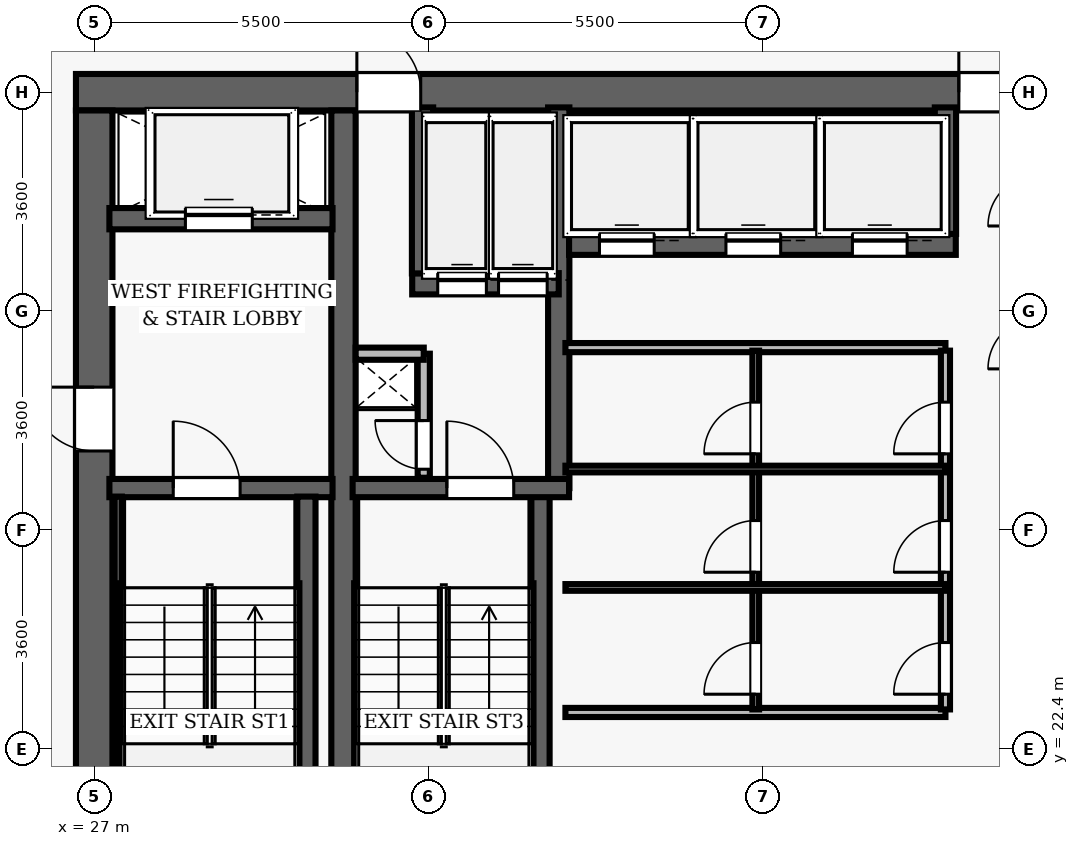
"""IFC4 building model, lengths in metres.
Left out: names, types, materials, properties, quantities, classifications, styles, units other than length and angle.
Written with IfcOpenShell. Run it as: python <this file> out.ifc"""

import sys

from ifc_helpers import new_model, si_unit, direction, frame, frame_2d, origin, place, context, subcontext, project, spatial, rectangle, extrude, element, fill, save


model = new_model("IFC4")
c1 = context("Model", 3, precision=1e-05, world=origin(), true_north=direction((0.0, 1.0)))
c2 = subcontext(c1, "Body", "Model", "MODEL_VIEW")
j1 = project(units=[si_unit("LENGTHUNIT", "METRE"), si_unit("PLANEANGLEUNIT", "RADIAN")], contexts=[c1])
p1 = place(None, origin())
s1 = spatial("IfcSite", under=j1, at=p1, CompositionType="ELEMENT")
p2 = place(p1, origin())
s2 = spatial("IfcBuilding", under=s1, at=p2, CompositionType="ELEMENT")
p3 = place(p2, frame((0.0, 0.0, 44.9)))
s3 = spatial("IfcBuildingStorey", under=s2, at=p3, CompositionType="ELEMENT", Elevation=44.9)
p4 = place(p3, frame((26.7, 33.2, 0.0), z_axis=(0.0, 0.0, 1.0), x_axis=(1.0, 0.0, 0.0)))
e1 = element("IfcWall", 1, at=p4, inside=s3, PredefinedType="SHEAR", context=c2, shape_type="SweptSolid", body=[
    extrude(rectangle(XDim=22.6, YDim=0.6, at=frame_2d((11.3, 0.0))), origin(), (0.0, 0.0, 1.0), 3.5),
])
p5 = place(p4, frame((4.62, 0.0, 0.0)))
e2 = element("IfcOpeningElement", 2, at=p5, cuts=e1, PredefinedType="OPENING", context=c2, shape_type="SweptSolid", body=[
    extrude(rectangle(XDim=1.05, YDim=2.15, at=frame_2d((0.525, 1.075))), frame((0.0, 0.31, 0.0), z_axis=(0.0, -1.0, 0.0), x_axis=(1.0, 0.0, 0.0)), (0.0, 0.0, 1.0), 0.62),
])
p6 = place(p4, frame((14.52, 0.0, 0.0)))
e3 = element("IfcOpeningElement", 3, at=p6, cuts=e1, PredefinedType="OPENING", context=c2, shape_type="SweptSolid", body=[
    extrude(rectangle(XDim=1.05, YDim=2.15, at=frame_2d((0.525, 1.075))), frame((0.0, 0.31, 0.0), z_axis=(0.0, -1.0, 0.0), x_axis=(1.0, 0.0, 0.0)), (0.0, 0.0, 1.0), 0.62),
])
p7 = place(p3, frame((27.0, 19.1, 0.0), z_axis=(0.0, 0.0, 1.0), x_axis=(0.0, 1.0, 0.0)))
e4 = element("IfcWall", 4, at=p7, inside=s3, PredefinedType="SHEAR", context=c2, shape_type="SweptSolid", body=[
    extrude(rectangle(XDim=13.8, YDim=0.6, at=frame_2d((6.9, 0.0))), origin(), (0.0, 0.0, 1.0), 3.5),
])
p8 = place(p7, frame((8.2, 0.0, 0.0)))
e5 = element("IfcOpeningElement", 5, at=p8, cuts=e4, PredefinedType="OPENING", context=c2, shape_type="SweptSolid", body=[
    extrude(rectangle(XDim=1.05, YDim=2.15, at=frame_2d((0.525, 1.075))), frame((0.0, 0.31, 0.0), z_axis=(0.0, -1.0, 0.0), x_axis=(1.0, 0.0, 0.0)), (0.0, 0.0, 1.0), 0.62),
])
p9 = place(p3, frame((31.1, 19.1, 0.0), z_axis=(0.0, 0.0, 1.0), x_axis=(0.0, 1.0, 0.0)))
e6 = element("IfcWall", 6, at=p9, inside=s3, PredefinedType="SHEAR", context=c2, shape_type="SweptSolid", body=[
    extrude(rectangle(XDim=13.8, YDim=0.4, at=frame_2d((6.9, 0.0))), origin(), (0.0, 0.0, 1.0), 3.5),
])
p10 = place(p3, frame((27.25, 26.69, 0.0), z_axis=(0.0, 0.0, 1.0), x_axis=(1.0, 0.0, 0.0)))
e7 = element("IfcWall", 7, at=p10, inside=s3, PredefinedType="SHEAR", context=c2, shape_type="SweptSolid", body=[
    extrude(rectangle(XDim=3.67, YDim=0.3, at=frame_2d((1.835, 0.0))), origin(), (0.0, 0.0, 1.0), 3.5),
])
p11 = place(p10, frame((1.05, 0.0, 0.0)))
e8 = element("IfcOpeningElement", 8, at=p11, cuts=e7, PredefinedType="OPENING", context=c2, shape_type="SweptSolid", body=[
    extrude(rectangle(XDim=1.1, YDim=2.15, at=frame_2d((0.55, 1.075))), frame((0.0, 0.16, 0.0), z_axis=(0.0, -1.0, 0.0), x_axis=(1.0, 0.0, 0.0)), (0.0, 0.0, 1.0), 0.32),
])
p12 = place(p3, frame((30.49, 19.05, 0.0), z_axis=(0.0, 0.0, 1.0), x_axis=(0.0, 1.0, 0.0)))
e9 = element("IfcWall", 9, at=p12, inside=s3, PredefinedType="SHEAR", context=c2, shape_type="SweptSolid", body=[
    extrude(rectangle(XDim=7.5, YDim=0.3, at=frame_2d((3.75, 0.0))), origin(), (0.0, 0.0, 1.0), 3.5),
])
p13 = place(p3, frame((27.395, 19.1, 0.0), z_axis=(0.0, 0.0, 1.0), x_axis=(0.0, 1.0, 0.0)))
e10 = element("IfcWall", 10, at=p13, inside=s3, PredefinedType="SHEAR", context=c2, shape_type="SweptSolid", body=[
    extrude(rectangle(XDim=7.45, YDim=0.12, at=frame_2d((3.725, 0.0))), origin(), (0.0, 0.0, 1.0), 3.5),
])
p14 = place(p3, frame((27.25, 31.12, 0.0), z_axis=(0.0, 0.0, 1.0), x_axis=(1.0, 0.0, 0.0)))
e11 = element("IfcWall", 11, at=p14, inside=s3, PredefinedType="SHEAR", context=c2, shape_type="SweptSolid", body=[
    extrude(rectangle(XDim=3.67, YDim=0.35, at=frame_2d((1.835, 0.0))), origin(), (0.0, 0.0, 1.0), 2.6),
])
p15 = place(p14, frame((1.25, 0.0, 0.0)))
e12 = element("IfcOpeningElement", 12, at=p15, cuts=e11, PredefinedType="OPENING", context=c2, shape_type="SweptSolid", body=[
    extrude(rectangle(XDim=1.1, YDim=2.15, at=frame_2d((0.55, 1.075))), frame((0.0, 0.185, 0.0), z_axis=(0.0, -1.0, 0.0), x_axis=(1.0, 0.0, 0.0)), (0.0, 0.0, 1.0), 0.37),
])
p16 = place(p3, frame((34.34, 19.05, 0.0), z_axis=(0.0, 0.0, 1.0), x_axis=(0.0, 1.0, 0.0)))
e13 = element("IfcWall", 13, at=p16, inside=s3, PredefinedType="SHEAR", context=c2, shape_type="SweptSolid", body=[
    extrude(rectangle(XDim=7.5, YDim=0.3, at=frame_2d((3.75, 0.0))), origin(), (0.0, 0.0, 1.0), 3.5),
])
p17 = place(p3, frame((34.64, 26.69, 0.0), z_axis=(0.0, 0.0, 1.0), x_axis=(0.0, 1.0, 0.0)))
e14 = element("IfcWall", 14, at=p17, inside=s3, PredefinedType="SHEAR", context=c2, shape_type="SweptSolid", body=[
    extrude(rectangle(XDim=6.26, YDim=0.35, at=frame_2d((3.13, 0.0))), origin(), (0.0, 0.0, 1.0), 3.5),
])
p18 = place(p3, frame((31.25, 26.69, 0.0), z_axis=(0.0, 0.0, 1.0), x_axis=(1.0, 0.0, 0.0)))
e15 = element("IfcWall", 15, at=p18, inside=s3, PredefinedType="SHEAR", context=c2, shape_type="SweptSolid", body=[
    extrude(rectangle(XDim=3.56, YDim=0.3, at=frame_2d((1.78, 0.0))), origin(), (0.0, 0.0, 1.0), 3.5),
])
p19 = place(p18, frame((1.55, 0.0, 0.0)))
e16 = element("IfcOpeningElement", 16, at=p19, cuts=e15, PredefinedType="OPENING", context=c2, shape_type="SweptSolid", body=[
    extrude(rectangle(XDim=1.1, YDim=2.15, at=frame_2d((0.55, 1.075))), frame((0.0, 0.16, 0.0), z_axis=(0.0, -1.0, 0.0), x_axis=(1.0, 0.0, 0.0)), (0.0, 0.0, 1.0), 0.32),
])
p20 = place(p3, frame((32.23, 30.05, 0.0), z_axis=(0.0, 0.0, 1.0), x_axis=(1.0, 0.0, 0.0)))
e17 = element("IfcWall", 17, at=p20, inside=s3, PredefinedType="SHEAR", context=c2, shape_type="SweptSolid", body=[
    extrude(rectangle(XDim=2.41, YDim=0.35, at=frame_2d((1.205, 0.0))), origin(), (0.0, 0.0, 1.0), 2.6),
])
p21 = place(p20, frame((0.42, 0.0, 0.0)))
e18 = element("IfcOpeningElement", 18, at=p21, cuts=e17, PredefinedType="OPENING", context=c2, shape_type="SweptSolid", body=[
    extrude(rectangle(XDim=0.8, YDim=2.15, at=frame_2d((0.4, 1.075))), frame((0.0, 0.185, 0.0), z_axis=(0.0, -1.0, 0.0), x_axis=(1.0, 0.0, 0.0)), (0.0, 0.0, 1.0), 0.37),
])
p22 = place(p20, frame((1.42, 0.0, 0.0)))
e19 = element("IfcOpeningElement", 19, at=p22, cuts=e17, PredefinedType="OPENING", context=c2, shape_type="SweptSolid", body=[
    extrude(rectangle(XDim=0.8, YDim=2.15, at=frame_2d((0.4, 1.075))), frame((0.0, 0.185, 0.0), z_axis=(0.0, -1.0, 0.0), x_axis=(1.0, 0.0, 0.0)), (0.0, 0.0, 1.0), 0.37),
])
p23 = place(p3, frame((32.4, 30.22, 0.0), z_axis=(0.0, 0.0, 1.0), x_axis=(0.0, 1.0, 0.0)))
e20 = element("IfcWall", 20, at=p23, inside=s3, PredefinedType="SHEAR", context=c2, shape_type="SweptSolid", body=[
    extrude(rectangle(XDim=2.73, YDim=0.35, at=frame_2d((1.365, 0.0))), origin(), (0.0, 0.0, 1.0), 2.6),
])
p24 = place(p3, frame((32.42, 26.86, 0.0), z_axis=(0.0, 0.0, 1.0), x_axis=(0.0, 1.0, 0.0)))
e21 = element("IfcWall", 21, at=p24, inside=s3, PredefinedType="PARTITIONING", context=c2, shape_type="SweptSolid", body=[
    extrude(rectangle(XDim=2.04, YDim=0.2, at=frame_2d((1.02, 0.0))), origin(), (0.0, 0.0, 1.0), 2.6),
])
p25 = place(p24, frame((0.14, 0.0, 0.0)))
e22 = element("IfcOpeningElement", 22, at=p25, cuts=e21, PredefinedType="OPENING", context=c2, shape_type="SweptSolid", body=[
    extrude(rectangle(XDim=0.8, YDim=2.05, at=frame_2d((0.4, 1.025))), frame((0.0, 0.11, 0.0), z_axis=(0.0, -1.0, 0.0), x_axis=(1.0, 0.0, 0.0)), (0.0, 0.0, 1.0), 0.22),
])
p26 = place(p3, frame((31.3, 28.9, 0.0), z_axis=(0.0, 0.0, 1.0), x_axis=(1.0, 0.0, 0.0)))
e23 = element("IfcWall", 23, at=p26, inside=s3, PredefinedType="PARTITIONING", context=c2, shape_type="SweptSolid", body=[
    extrude(rectangle(XDim=1.12, YDim=0.2, at=frame_2d((0.56, 0.0))), origin(), (0.0, 0.0, 1.0), 2.6),
])
p27 = place(p3, frame((34.81, 30.7, 0.0), z_axis=(0.0, 0.0, 1.0), x_axis=(1.0, 0.0, 0.0)))
e24 = element("IfcWall", 24, at=p27, inside=s3, PredefinedType="SHEAR", context=c2, shape_type="SweptSolid", body=[
    extrude(rectangle(XDim=6.36, YDim=0.35, at=frame_2d((3.18, 0.0))), origin(), (0.0, 0.0, 1.0), 2.6),
])
p28 = place(p27, frame((0.5, 0.0, 0.0)))
e25 = element("IfcOpeningElement", 25, at=p28, cuts=e24, PredefinedType="OPENING", context=c2, shape_type="SweptSolid", body=[
    extrude(rectangle(XDim=0.9, YDim=2.15, at=frame_2d((0.45, 1.075))), frame((0.0, 0.185, 0.0), z_axis=(0.0, -1.0, 0.0), x_axis=(1.0, 0.0, 0.0)), (0.0, 0.0, 1.0), 0.37),
])
p29 = place(p27, frame((2.58, 0.0, 0.0)))
e26 = element("IfcOpeningElement", 26, at=p29, cuts=e24, PredefinedType="OPENING", context=c2, shape_type="SweptSolid", body=[
    extrude(rectangle(XDim=0.9, YDim=2.15, at=frame_2d((0.45, 1.075))), frame((0.0, 0.185, 0.0), z_axis=(0.0, -1.0, 0.0), x_axis=(1.0, 0.0, 0.0)), (0.0, 0.0, 1.0), 0.37),
])
p30 = place(p27, frame((4.66, 0.0, 0.0)))
e27 = element("IfcOpeningElement", 27, at=p30, cuts=e24, PredefinedType="OPENING", context=c2, shape_type="SweptSolid", body=[
    extrude(rectangle(XDim=0.9, YDim=2.15, at=frame_2d((0.45, 1.075))), frame((0.0, 0.185, 0.0), z_axis=(0.0, -1.0, 0.0), x_axis=(1.0, 0.0, 0.0)), (0.0, 0.0, 1.0), 0.37),
])
p31 = place(p3, frame((41.0, 30.87, 0.0), z_axis=(0.0, 0.0, 1.0), x_axis=(0.0, 1.0, 0.0)))
e28 = element("IfcWall", 28, at=p31, inside=s3, PredefinedType="SHEAR", context=c2, shape_type="SweptSolid", body=[
    extrude(rectangle(XDim=2.08, YDim=0.35, at=frame_2d((1.04, 0.0))), origin(), (0.0, 0.0, 1.0), 2.6),
])
for number, where, z_axis, x_axis in (
    (29, (34.75, 29.0, 0.0), (0.0, 0.0, 1.0), (1.0, 0.0, 0.0)),
    (30, (34.75, 23.0, 0.0), (0.0, 0.0, 1.0), (1.0, 0.0, 0.0)),
):
    element("IfcWall", number, at=place(p3, frame(where, z_axis=z_axis, x_axis=x_axis)), inside=s3, PredefinedType="PARTITIONING", context=c2, shape_type="SweptSolid", body=[
        extrude(rectangle(XDim=6.25, YDim=0.15, at=frame_2d((3.125, 0.0))), origin(), (0.0, 0.0, 1.0), 2.6),
    ])
p32 = place(p3, frame((41.0, 23.05, 0.0), z_axis=(0.0, 0.0, 1.0), x_axis=(0.0, 1.0, 0.0)))
e31 = element("IfcWall", 31, at=p32, inside=s3, PredefinedType="PARTITIONING", context=c2, shape_type="SweptSolid", body=[
    extrude(rectangle(XDim=5.9, YDim=0.15, at=frame_2d((2.95, 0.0))), origin(), (0.0, 0.0, 1.0), 2.6),
])
p33 = place(p32, frame((0.25, 0.0, 0.0)))
e32 = element("IfcOpeningElement", 32, at=p33, cuts=e31, PredefinedType="OPENING", context=c2, shape_type="SweptSolid", body=[
    extrude(rectangle(XDim=0.85, YDim=2.1, at=frame_2d((0.425, 1.05))), frame((0.0, 0.085, 0.0), z_axis=(0.0, -1.0, 0.0), x_axis=(1.0, 0.0, 0.0)), (0.0, 0.0, 1.0), 0.17),
])
p34 = place(p32, frame((2.256, 0.0, 0.0)))
e33 = element("IfcOpeningElement", 33, at=p34, cuts=e31, PredefinedType="OPENING", context=c2, shape_type="SweptSolid", body=[
    extrude(rectangle(XDim=0.85, YDim=2.1, at=frame_2d((0.425, 1.05))), frame((0.0, 0.085, 0.0), z_axis=(0.0, -1.0, 0.0), x_axis=(1.0, 0.0, 0.0)), (0.0, 0.0, 1.0), 0.17),
])
p35 = place(p32, frame((4.203, 0.0, 0.0)))
e34 = element("IfcOpeningElement", 34, at=p35, cuts=e31, PredefinedType="OPENING", context=c2, shape_type="SweptSolid", body=[
    extrude(rectangle(XDim=0.85, YDim=2.1, at=frame_2d((0.425, 1.05))), frame((0.0, 0.085, 0.0), z_axis=(0.0, -1.0, 0.0), x_axis=(1.0, 0.0, 0.0)), (0.0, 0.0, 1.0), 0.17),
])
p36 = place(p3, frame((37.88, 23.05, 0.0), z_axis=(0.0, 0.0, 1.0), x_axis=(0.0, 1.0, 0.0)))
e35 = element("IfcWall", 35, at=p36, inside=s3, PredefinedType="PARTITIONING", context=c2, shape_type="SweptSolid", body=[
    extrude(rectangle(XDim=5.9, YDim=0.11, at=frame_2d((2.95, 0.0))), origin(), (0.0, 0.0, 1.0), 2.6),
])
p37 = place(p36, frame((0.25, 0.0, 0.0)))
e36 = element("IfcOpeningElement", 36, at=p37, cuts=e35, PredefinedType="OPENING", context=c2, shape_type="SweptSolid", body=[
    extrude(rectangle(XDim=0.85, YDim=2.1, at=frame_2d((0.425, 1.05))), frame((0.0, 0.065, 0.0), z_axis=(0.0, -1.0, 0.0), x_axis=(1.0, 0.0, 0.0)), (0.0, 0.0, 1.0), 0.13),
])
p38 = place(p36, frame((2.256, 0.0, 0.0)))
e37 = element("IfcOpeningElement", 37, at=p38, cuts=e35, PredefinedType="OPENING", context=c2, shape_type="SweptSolid", body=[
    extrude(rectangle(XDim=0.85, YDim=2.1, at=frame_2d((0.425, 1.05))), frame((0.0, 0.065, 0.0), z_axis=(0.0, -1.0, 0.0), x_axis=(1.0, 0.0, 0.0)), (0.0, 0.0, 1.0), 0.13),
])
p39 = place(p36, frame((4.203, 0.0, 0.0)))
e38 = element("IfcOpeningElement", 38, at=p39, cuts=e35, PredefinedType="OPENING", context=c2, shape_type="SweptSolid", body=[
    extrude(rectangle(XDim=0.85, YDim=2.1, at=frame_2d((0.425, 1.05))), frame((0.0, 0.065, 0.0), z_axis=(0.0, -1.0, 0.0), x_axis=(1.0, 0.0, 0.0)), (0.0, 0.0, 1.0), 0.13),
])
for number, where, z_axis, x_axis in (
    (39, (34.75, 25.056, 0.0), (0.0, 0.0, 1.0), (1.0, 0.0, 0.0)),
    (40, (34.75, 27.003, 0.0), (0.0, 0.0, 1.0), (1.0, 0.0, 0.0)),
):
    element("IfcWall", number, at=place(p3, frame(where, z_axis=z_axis, x_axis=x_axis)), inside=s3, PredefinedType="PARTITIONING", context=c2, shape_type="SweptSolid", body=[
        extrude(rectangle(XDim=6.25, YDim=0.11, at=frame_2d((3.125, 0.0))), origin(), (0.0, 0.0, 1.0), 2.6),
    ])
p40 = place(p11, origin())
e41 = element("IfcDoor", 41, at=p40, inside=s3, OperationType="SINGLE_SWING_LEFT", PredefinedType="DOOR", context=c2, shape_type="SweptSolid", body=[
    extrude(rectangle(XDim=1.1, YDim=2.15, at=frame_2d((0.55, 1.075))), frame((0.0, 0.025, 0.0), z_axis=(0.0, -1.0, 0.0), x_axis=(1.0, 0.0, 0.0)), (0.0, 0.0, 1.0), 0.05),
])
fill(e8, e41)
p41 = place(p8, origin())
e42 = element("IfcDoor", 42, at=p41, inside=s3, OperationType="SINGLE_SWING_RIGHT", PredefinedType="DOOR", context=c2, shape_type="SweptSolid", body=[
    extrude(rectangle(XDim=1.05, YDim=2.15, at=frame_2d((0.525, 1.075))), frame((0.0, 0.025, 0.0), z_axis=(0.0, -1.0, 0.0), x_axis=(1.0, 0.0, 0.0)), (0.0, 0.0, 1.0), 0.05),
])
fill(e5, e42)
p42 = place(p19, origin())
e43 = element("IfcDoor", 43, at=p42, inside=s3, OperationType="SINGLE_SWING_LEFT", PredefinedType="DOOR", context=c2, shape_type="SweptSolid", body=[
    extrude(rectangle(XDim=1.1, YDim=2.15, at=frame_2d((0.55, 1.075))), frame((0.0, 0.025, 0.0), z_axis=(0.0, -1.0, 0.0), x_axis=(1.0, 0.0, 0.0)), (0.0, 0.0, 1.0), 0.05),
])
fill(e16, e43)
p43 = place(p25, origin())
e44 = element("IfcDoor", 44, at=p43, inside=s3, OperationType="SINGLE_SWING_RIGHT", PredefinedType="DOOR", context=c2, shape_type="SweptSolid", body=[
    extrude(rectangle(XDim=0.8, YDim=2.05, at=frame_2d((0.4, 1.025))), frame((0.0, 0.025, 0.0), z_axis=(0.0, -1.0, 0.0), x_axis=(1.0, 0.0, 0.0)), (0.0, 0.0, 1.0), 0.05),
])
fill(e22, e44)
p44 = place(p5, origin())
e45 = element("IfcDoor", 45, at=p44, inside=s3, OperationType="SINGLE_SWING_LEFT", PredefinedType="DOOR", context=c2, shape_type="SweptSolid", body=[
    extrude(rectangle(XDim=1.05, YDim=2.15, at=frame_2d((0.525, 1.075))), frame((0.0, 0.025, 0.0), z_axis=(0.0, -1.0, 0.0), x_axis=(1.0, 0.0, 0.0)), (0.0, 0.0, 1.0), 0.05),
])
fill(e2, e45)
p45 = place(p6, origin())
e46 = element("IfcDoor", 46, at=p45, inside=s3, OperationType="SINGLE_SWING_LEFT", PredefinedType="DOOR", context=c2, shape_type="SweptSolid", body=[
    extrude(rectangle(XDim=1.05, YDim=2.15, at=frame_2d((0.525, 1.075))), frame((0.0, 0.025, 0.0), z_axis=(0.0, -1.0, 0.0), x_axis=(1.0, 0.0, 0.0)), (0.0, 0.0, 1.0), 0.05),
])
fill(e3, e46)
p46 = place(p33, origin())
e47 = element("IfcDoor", 47, at=p46, inside=s3, OperationType="SINGLE_SWING_LEFT", PredefinedType="DOOR", context=c2, shape_type="SweptSolid", body=[
    extrude(rectangle(XDim=0.85, YDim=2.1, at=frame_2d((0.425, 1.05))), frame((0.0, 0.025, 0.0), z_axis=(0.0, -1.0, 0.0), x_axis=(1.0, 0.0, 0.0)), (0.0, 0.0, 1.0), 0.05),
])
fill(e32, e47)
p47 = place(p37, origin())
e48 = element("IfcDoor", 48, at=p47, inside=s3, OperationType="SINGLE_SWING_LEFT", PredefinedType="DOOR", context=c2, shape_type="SweptSolid", body=[
    extrude(rectangle(XDim=0.85, YDim=2.1, at=frame_2d((0.425, 1.05))), frame((0.0, 0.025, 0.0), z_axis=(0.0, -1.0, 0.0), x_axis=(1.0, 0.0, 0.0)), (0.0, 0.0, 1.0), 0.05),
])
fill(e36, e48)
p48 = place(p34, origin())
e49 = element("IfcDoor", 49, at=p48, inside=s3, OperationType="SINGLE_SWING_LEFT", PredefinedType="DOOR", context=c2, shape_type="SweptSolid", body=[
    extrude(rectangle(XDim=0.85, YDim=2.1, at=frame_2d((0.425, 1.05))), frame((0.0, 0.025, 0.0), z_axis=(0.0, -1.0, 0.0), x_axis=(1.0, 0.0, 0.0)), (0.0, 0.0, 1.0), 0.05),
])
fill(e33, e49)
p49 = place(p38, origin())
e50 = element("IfcDoor", 50, at=p49, inside=s3, OperationType="SINGLE_SWING_LEFT", PredefinedType="DOOR", context=c2, shape_type="SweptSolid", body=[
    extrude(rectangle(XDim=0.85, YDim=2.1, at=frame_2d((0.425, 1.05))), frame((0.0, 0.025, 0.0), z_axis=(0.0, -1.0, 0.0), x_axis=(1.0, 0.0, 0.0)), (0.0, 0.0, 1.0), 0.05),
])
fill(e37, e50)
p50 = place(p35, origin())
e51 = element("IfcDoor", 51, at=p50, inside=s3, OperationType="SINGLE_SWING_LEFT", PredefinedType="DOOR", context=c2, shape_type="SweptSolid", body=[
    extrude(rectangle(XDim=0.85, YDim=2.1, at=frame_2d((0.425, 1.05))), frame((0.0, 0.025, 0.0), z_axis=(0.0, -1.0, 0.0), x_axis=(1.0, 0.0, 0.0)), (0.0, 0.0, 1.0), 0.05),
])
fill(e34, e51)
p51 = place(p39, origin())
e52 = element("IfcDoor", 52, at=p51, inside=s3, OperationType="SINGLE_SWING_LEFT", PredefinedType="DOOR", context=c2, shape_type="SweptSolid", body=[
    extrude(rectangle(XDim=0.85, YDim=2.1, at=frame_2d((0.425, 1.05))), frame((0.0, 0.025, 0.0), z_axis=(0.0, -1.0, 0.0), x_axis=(1.0, 0.0, 0.0)), (0.0, 0.0, 1.0), 0.05),
])
fill(e38, e52)
p52 = place(p28, origin())
e53 = element("IfcDoor", 53, at=p52, inside=s3, OperationType="SLIDING_TO_LEFT", PredefinedType="DOOR", context=c2, shape_type="SweptSolid", body=[
    extrude(rectangle(XDim=0.9, YDim=2.15, at=frame_2d((0.45, 1.075))), frame((0.0, 0.025, 0.0), z_axis=(0.0, -1.0, 0.0), x_axis=(1.0, 0.0, 0.0)), (0.0, 0.0, 1.0), 0.05),
])
fill(e25, e53)
p53 = place(p29, origin())
e54 = element("IfcDoor", 54, at=p53, inside=s3, OperationType="SLIDING_TO_LEFT", PredefinedType="DOOR", context=c2, shape_type="SweptSolid", body=[
    extrude(rectangle(XDim=0.9, YDim=2.15, at=frame_2d((0.45, 1.075))), frame((0.0, 0.025, 0.0), z_axis=(0.0, -1.0, 0.0), x_axis=(1.0, 0.0, 0.0)), (0.0, 0.0, 1.0), 0.05),
])
fill(e26, e54)
p54 = place(p30, origin())
e55 = element("IfcDoor", 55, at=p54, inside=s3, OperationType="SLIDING_TO_LEFT", PredefinedType="DOOR", context=c2, shape_type="SweptSolid", body=[
    extrude(rectangle(XDim=0.9, YDim=2.15, at=frame_2d((0.45, 1.075))), frame((0.0, 0.025, 0.0), z_axis=(0.0, -1.0, 0.0), x_axis=(1.0, 0.0, 0.0)), (0.0, 0.0, 1.0), 0.05),
])
fill(e27, e55)
p55 = place(p15, origin())
e56 = element("IfcDoor", 56, at=p55, inside=s3, OperationType="SLIDING_TO_LEFT", PredefinedType="DOOR", context=c2, shape_type="SweptSolid", body=[
    extrude(rectangle(XDim=1.1, YDim=2.15, at=frame_2d((0.55, 1.075))), frame((0.0, 0.025, 0.0), z_axis=(0.0, -1.0, 0.0), x_axis=(1.0, 0.0, 0.0)), (0.0, 0.0, 1.0), 0.05),
])
fill(e12, e56)
p56 = place(p21, origin())
e57 = element("IfcDoor", 57, at=p56, inside=s3, OperationType="SLIDING_TO_LEFT", PredefinedType="DOOR", context=c2, shape_type="SweptSolid", body=[
    extrude(rectangle(XDim=0.8, YDim=2.15, at=frame_2d((0.4, 1.075))), frame((0.0, 0.025, 0.0), z_axis=(0.0, -1.0, 0.0), x_axis=(1.0, 0.0, 0.0)), (0.0, 0.0, 1.0), 0.05),
])
fill(e18, e57)
p57 = place(p22, origin())
e58 = element("IfcDoor", 58, at=p57, inside=s3, OperationType="SLIDING_TO_LEFT", PredefinedType="DOOR", context=c2, shape_type="SweptSolid", body=[
    extrude(rectangle(XDim=0.8, YDim=2.15, at=frame_2d((0.4, 1.075))), frame((0.0, 0.025, 0.0), z_axis=(0.0, -1.0, 0.0), x_axis=(1.0, 0.0, 0.0)), (0.0, 0.0, 1.0), 0.05),
])
fill(e19, e58)
save(model, sys.argv[1])
